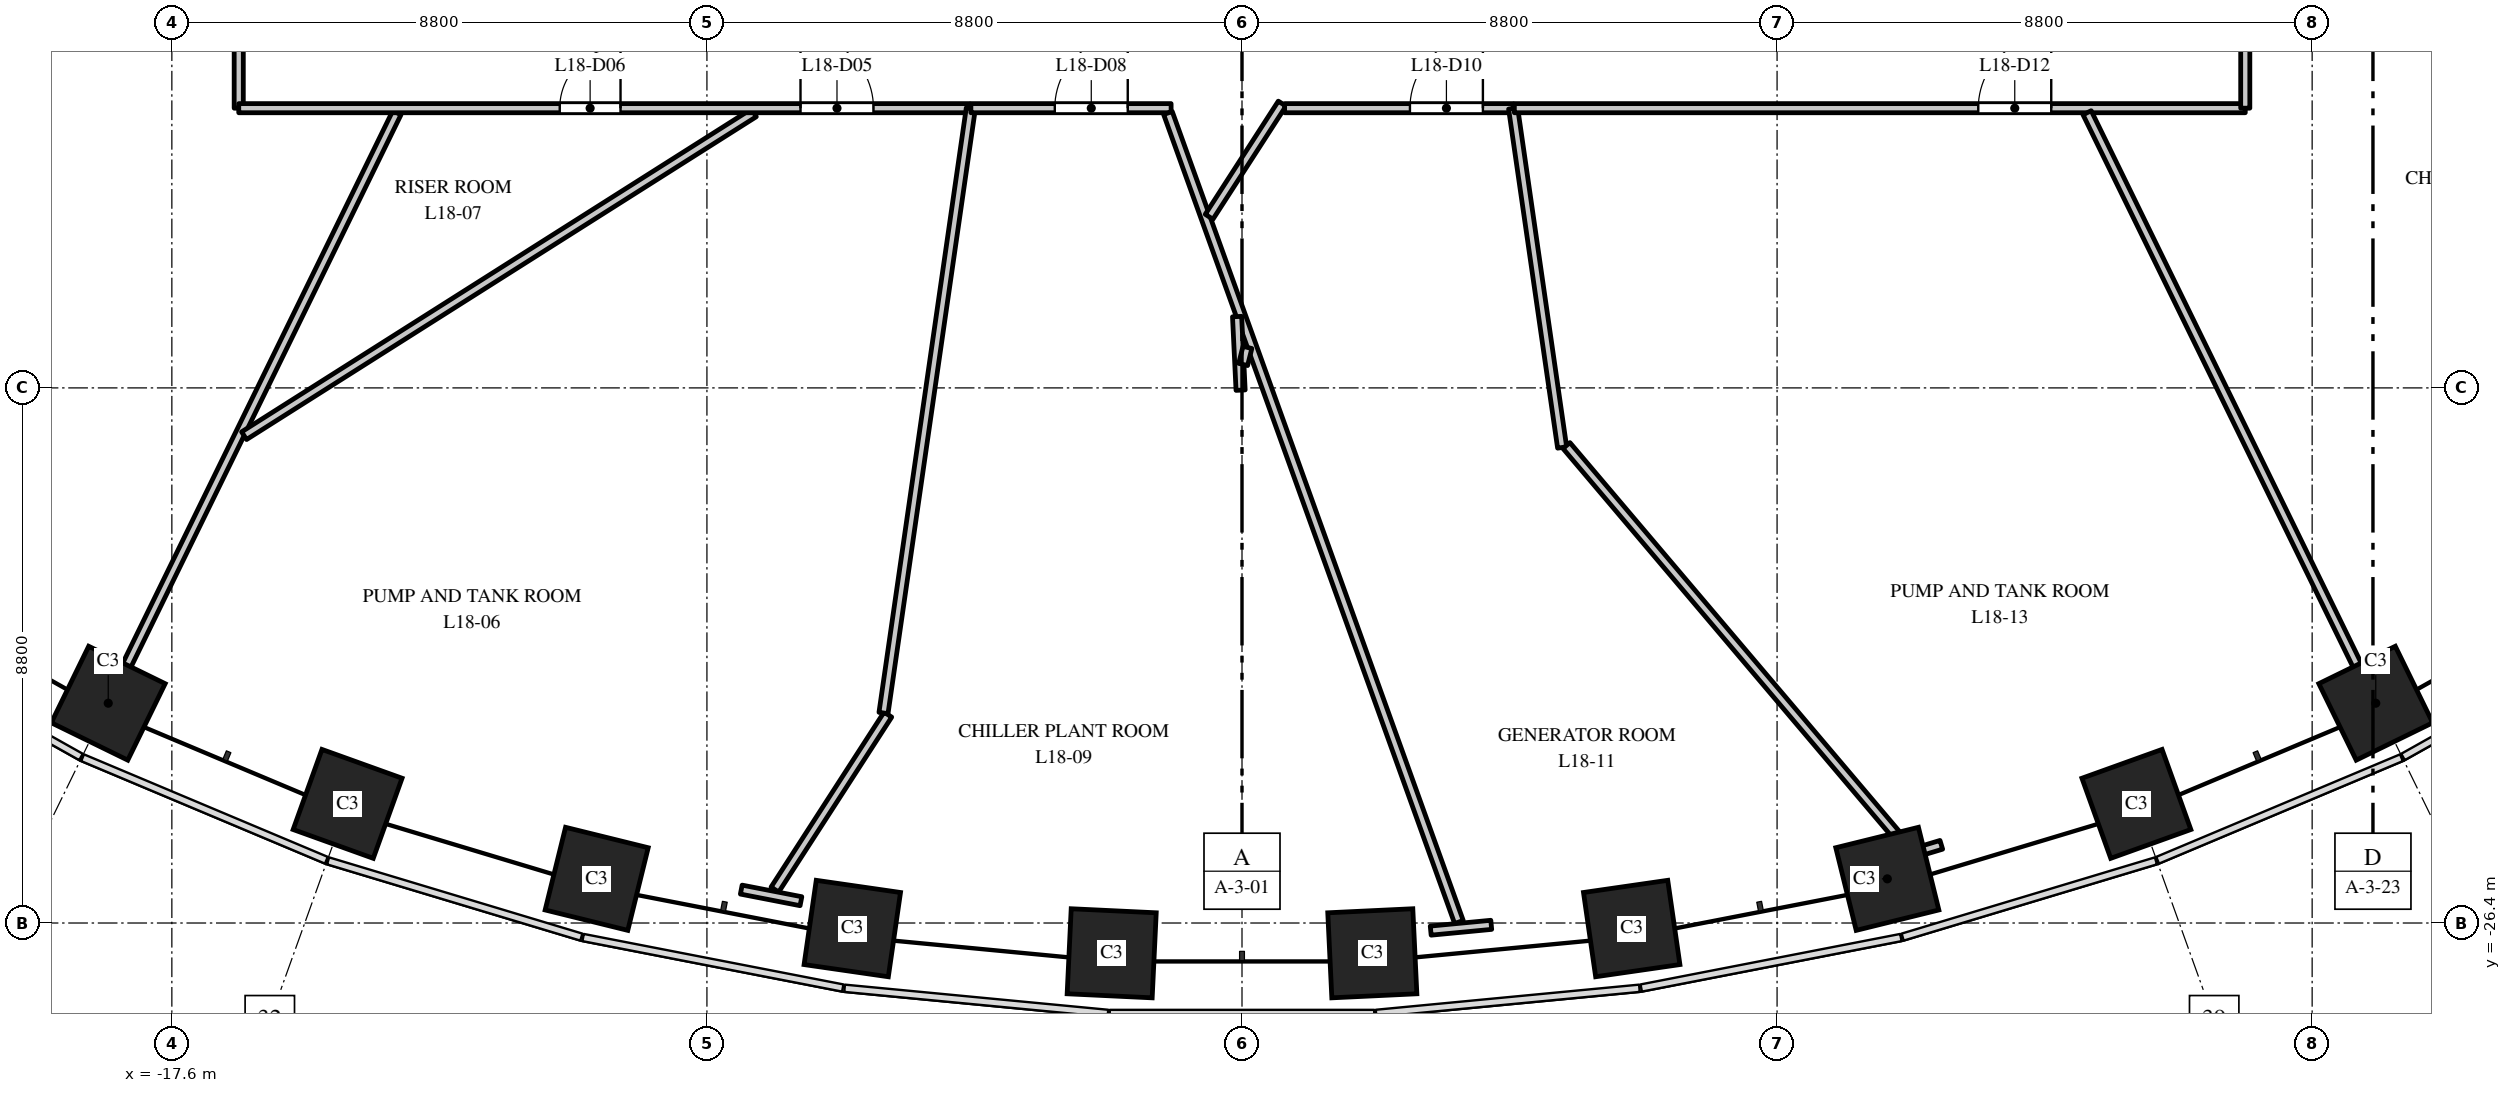
"""IFC4 building model, lengths in metres.
Left out: names, types, materials, properties, quantities, classifications, styles, units other than length and angle.
Written with IfcOpenShell. Run it as: python <this file> out.ifc"""

import sys

from ifc_helpers import new_model, si_unit, direction, frame, frame_2d, origin, origin_2d, place, context, subcontext, project, spatial, rectangle, extrude, element, fill, save


model = new_model("IFC4")
c1 = context("Model", 3, precision=1e-05, world=origin(), true_north=direction((0.0, 1.0)))
c2 = subcontext(c1, "Body", "Model", "MODEL_VIEW")
j1 = project(units=[si_unit("LENGTHUNIT", "METRE"), si_unit("PLANEANGLEUNIT", "RADIAN")], contexts=[c1])
p1 = place(None, origin())
s1 = spatial("IfcSite", under=j1, at=p1, CompositionType="ELEMENT")
p2 = place(p1, origin())
s2 = spatial("IfcBuilding", under=s1, at=p2, CompositionType="ELEMENT")
p3 = place(p2, frame((0.0, 0.0, 82.5)))
s3 = spatial("IfcBuildingStorey", under=s2, at=p3, CompositionType="ELEMENT", Elevation=82.5)
for number, where, z_axis, x_axis in (
    (1, (-18.646, -22.785, 0.0), (0.0, 0.0, 1.0), (0.898, -0.439, 0.0)),
    (2, (-14.709, -24.441, 0.0), (0.0, 0.0, 1.0), (0.941, -0.338, 0.0)),
    (3, (-10.613, -25.674, 0.0), (0.0, 0.0, 1.0), (0.971, -0.24, 0.0)),
    (4, (-6.409, -26.491, 0.0), (0.0, 0.0, 1.0), (0.99, -0.143, 0.0)),
    (5, (-2.143, -26.898, 0.0), (0.0, 0.0, 1.0), (0.999, -0.048, 0.0)),
    (6, (2.143, -26.898, 0.0), (0.0, 0.0, 1.0), (0.999, 0.048, 0.0)),
    (7, (6.409, -26.491, 0.0), (0.0, 0.0, 1.0), (0.99, 0.143, 0.0)),
    (8, (10.613, -25.674, 0.0), (0.0, 0.0, 1.0), (0.971, 0.24, 0.0)),
    (9, (14.709, -24.441, 0.0), (0.0, 0.0, 1.0), (0.941, 0.338, 0.0)),
    (10, (18.646, -22.785, 0.0), (0.0, 0.0, 1.0), (0.898, 0.439, 0.0)),
):
    element("IfcColumn", number, at=place(p3, frame(where, z_axis=z_axis, x_axis=x_axis)), inside=s3, PredefinedType="COLUMN", context=c2, shape_type="SweptSolid", body=[
        extrude(rectangle(XDim=1.4, YDim=1.4, at=origin_2d()), origin(), (0.0, 0.0, 1.0), 5.5),
    ])
p4 = place(p3, frame((-18.69, -22.875, 0.0), z_axis=(0.0, 0.0, 1.0), x_axis=(0.439201300969, 0.898388678261, 0.0)))
e11 = element("IfcWall", 11, at=p4, inside=s3, PredefinedType="PARTITIONING", context=c2, shape_type="SweptSolid", body=[
    extrude(rectangle(XDim=10.908, YDim=0.15, at=frame_2d((5.454, 0.0))), origin(), (0.0, 0.0, 1.0), 5.2),
])
p5 = place(p3, frame((-16.412, -18.386, 0.0), z_axis=(0.0, 0.0, 1.0), x_axis=(0.844855771647, 0.534994135588, 0.0)))
e12 = element("IfcWall", 12, at=p5, inside=s3, PredefinedType="PARTITIONING", context=c2, shape_type="SweptSolid", body=[
    extrude(rectangle(XDim=9.924, YDim=0.15, at=frame_2d((4.962, 0.0))), origin(), (0.0, 0.0, 1.0), 4.35),
])
p6 = place(p3, frame((-16.5, -13.0, 0.0), z_axis=(0.0, 0.0, 1.0), x_axis=(0.0, 1.0, 0.0)))
e13 = element("IfcWall", 13, at=p6, inside=s3, PredefinedType="PARTITIONING", context=c2, shape_type="SweptSolid", body=[
    extrude(rectangle(XDim=2.3, YDim=0.15, at=frame_2d((1.15, 0.0))), origin(), (0.0, 0.0, 1.0), 4.25),
])
p7 = place(p3, frame((-16.5, -13.0, 0.0), z_axis=(0.0, 0.0, 1.0), x_axis=(1.0, 0.0, 0.0)))
e14 = element("IfcWall", 14, at=p7, inside=s3, PredefinedType="PARTITIONING", context=c2, shape_type="SweptSolid", body=[
    extrude(rectangle(XDim=12.021, YDim=0.15, at=frame_2d((6.01, 0.0))), origin(), (0.0, 0.0, 1.0), 4.35),
])
p8 = place(p7, frame((9.239, 0.0, 0.0)))
e15 = element("IfcOpeningElement", 15, at=p8, cuts=e14, PredefinedType="OPENING", context=c2, shape_type="SweptSolid", body=[
    extrude(rectangle(XDim=1.2, YDim=2.1, at=frame_2d((0.6, 1.05))), frame((0.0, 0.085, 0.0), z_axis=(0.0, -1.0, 0.0), x_axis=(1.0, 0.0, 0.0)), (0.0, 0.0, 1.0), 0.17),
])
p9 = place(p7, frame((5.279, 0.0, 0.0)))
e16 = element("IfcOpeningElement", 16, at=p9, cuts=e14, PredefinedType="OPENING", context=c2, shape_type="SweptSolid", body=[
    extrude(rectangle(XDim=1.0, YDim=2.1, at=frame_2d((0.5, 1.05))), frame((0.0, 0.085, 0.0), z_axis=(0.0, -1.0, 0.0), x_axis=(1.0, 0.0, 0.0)), (0.0, 0.0, 1.0), 0.17),
])
p10 = place(p3, frame((-7.683, -25.85, 0.0), z_axis=(0.0, 0.0, 1.0), x_axis=(0.542618686321, 0.839979143346, 0.0)))
e17 = element("IfcWall", 17, at=p10, inside=s3, PredefinedType="PARTITIONING", context=c2, shape_type="SweptSolid", body=[
    extrude(rectangle(XDim=3.425, YDim=0.15, at=frame_2d((1.713, 0.0))), origin(), (0.0, 0.0, 1.0), 4.4),
])
p11 = place(p3, frame((-5.896, -22.946, 0.0), z_axis=(0.0, 0.0, 1.0), x_axis=(0.142955736686, 0.989729082804, 0.0)))
e18 = element("IfcWall", 18, at=p11, inside=s3, PredefinedType="PARTITIONING", context=c2, shape_type="SweptSolid", body=[
    extrude(rectangle(XDim=10.045, YDim=0.15, at=frame_2d((5.023, 0.0))), origin(), (0.0, 0.0, 1.0), 5.2),
])
p12 = place(p3, frame((-4.459, -13.0, 0.0), z_axis=(0.0, 0.0, 1.0), x_axis=(1.0, 0.0, 0.0)))
e19 = element("IfcWall", 19, at=p12, inside=s3, PredefinedType="PARTITIONING", context=c2, shape_type="SweptSolid", body=[
    extrude(rectangle(XDim=3.293, YDim=0.15, at=frame_2d((1.646, 0.0))), origin(), (0.0, 0.0, 1.0), 5.2),
])
p13 = place(p12, frame((1.38, 0.0, 0.0)))
e20 = element("IfcOpeningElement", 20, at=p13, cuts=e19, PredefinedType="OPENING", context=c2, shape_type="SweptSolid", body=[
    extrude(rectangle(XDim=1.2, YDim=2.1, at=frame_2d((0.6, 1.05))), frame((0.0, 0.085, 0.0), z_axis=(0.0, -1.0, 0.0), x_axis=(1.0, 0.0, 0.0)), (0.0, 0.0, 1.0), 0.17),
])
p14 = place(p3, frame((-1.218, -13.079, 0.0), z_axis=(0.0, 0.0, 1.0), x_axis=(0.338466321872, -0.940978506109, 0.0)))
e21 = element("IfcWall", 21, at=p14, inside=s3, PredefinedType="PARTITIONING", context=c2, shape_type="SweptSolid", body=[
    extrude(rectangle(XDim=14.139, YDim=0.15, at=frame_2d((7.07, 0.0))), origin(), (0.0, 0.0, 1.0), 4.35),
])
p15 = place(p3, frame((-0.081, -16.427, 0.0), z_axis=(0.0, 0.0, 1.0), x_axis=(0.047967320325, -0.998848905581, 0.0)))
e22 = element("IfcWall", 22, at=p15, inside=s3, PredefinedType="PARTITIONING", context=c2, shape_type="SweptSolid", body=[
    extrude(rectangle(XDim=1.211, YDim=0.15, at=frame_2d((0.606, 0.0))), origin(), (0.0, 0.0, 1.0), 5.2),
])
p16 = place(p3, frame((-0.541, -14.786, 0.0), z_axis=(0.0, 0.0, 1.0), x_axis=(0.542249897207, 0.840217262962, 0.0)))
e23 = element("IfcWall", 23, at=p16, inside=s3, PredefinedType="PARTITIONING", context=c2, shape_type="SweptSolid", body=[
    extrude(rectangle(XDim=2.215, YDim=0.15, at=frame_2d((1.107, 0.0))), origin(), (0.0, 0.0, 1.0), 5.2),
])
p17 = place(p3, frame((0.019, -17.215, 0.0), z_axis=(0.0, 0.0, 1.0), x_axis=(0.241940521765, 0.970291082061, 0.0)))
e24 = element("IfcWall", 24, at=p17, inside=s3, PredefinedType="PARTITIONING", context=c2, shape_type="SweptSolid", body=[
    extrude(rectangle(XDim=0.29, YDim=0.15, at=frame_2d((0.145, 0.0))), origin(), (0.0, 0.0, 1.0), 5.2),
])
p18 = place(p3, frame((0.701, -13.0, 0.0), z_axis=(0.0, 0.0, 1.0), x_axis=(1.0, 0.0, 0.0)))
e25 = element("IfcWall", 25, at=p18, inside=s3, PredefinedType="PARTITIONING", context=c2, shape_type="SweptSolid", body=[
    extrude(rectangle(XDim=3.758, YDim=0.15, at=frame_2d((1.879, 0.0))), origin(), (0.0, 0.0, 1.0), 4.35),
])
p19 = place(p18, frame((2.061, 0.0, 0.0)))
e26 = element("IfcOpeningElement", 26, at=p19, cuts=e25, PredefinedType="OPENING", context=c2, shape_type="SweptSolid", body=[
    extrude(rectangle(XDim=1.2, YDim=2.1, at=frame_2d((0.6, 1.05))), frame((0.0, 0.085, 0.0), z_axis=(0.0, -1.0, 0.0), x_axis=(1.0, 0.0, 0.0)), (0.0, 0.0, 1.0), 0.17),
])
p20 = place(p3, frame((4.459, -13.004, 0.0), z_axis=(0.0, 0.0, 1.0), x_axis=(0.143040939826, -0.989716772382, 0.0)))
e27 = element("IfcWall", 27, at=p20, inside=s3, PredefinedType="PARTITIONING", context=c2, shape_type="SweptSolid", body=[
    extrude(rectangle(XDim=5.634, YDim=0.15, at=frame_2d((2.817, 0.0))), origin(), (0.0, 0.0, 1.0), 5.2),
])
p21 = place(p3, frame((4.479, -13.0, 0.0), z_axis=(0.0, 0.0, 1.0), x_axis=(1.0, 0.0, 0.0)))
e28 = element("IfcWall", 28, at=p21, inside=s3, PredefinedType="PARTITIONING", context=c2, shape_type="SweptSolid", body=[
    extrude(rectangle(XDim=12.021, YDim=0.15, at=frame_2d((6.01, 0.0))), origin(), (0.0, 0.0, 1.0), 4.35),
])
p22 = place(p21, frame((7.63, 0.0, 0.0)))
e29 = element("IfcOpeningElement", 29, at=p22, cuts=e28, PredefinedType="OPENING", context=c2, shape_type="SweptSolid", body=[
    extrude(rectangle(XDim=1.2, YDim=2.1, at=frame_2d((0.6, 1.05))), frame((0.0, 0.085, 0.0), z_axis=(0.0, -1.0, 0.0), x_axis=(1.0, 0.0, 0.0)), (0.0, 0.0, 1.0), 0.17),
])
p23 = place(p3, frame((5.336, -18.548, 0.0), z_axis=(0.0, 0.0, 1.0), x_axis=(0.64652969132, -0.7628888243, 0.0)))
e30 = element("IfcWall", 30, at=p23, inside=s3, PredefinedType="PARTITIONING", context=c2, shape_type="SweptSolid", body=[
    extrude(rectangle(XDim=8.735, YDim=0.15, at=frame_2d((4.367, 0.0))), origin(), (0.0, 0.0, 1.0), 4.4),
])
p24 = place(p3, frame((13.899, -13.075, 0.0), z_axis=(0.0, 0.0, 1.0), x_axis=(0.439201300969, -0.898388678261, 0.0)))
e31 = element("IfcWall", 31, at=p24, inside=s3, PredefinedType="PARTITIONING", context=c2, shape_type="SweptSolid", body=[
    extrude(rectangle(XDim=10.908, YDim=0.15, at=frame_2d((5.454, 0.0))), origin(), (0.0, 0.0, 1.0), 5.2),
])
p25 = place(p3, frame((16.5, -13.0, 0.0), z_axis=(0.0, 0.0, 1.0), x_axis=(0.0, 1.0, 0.0)))
e32 = element("IfcWall", 32, at=p25, inside=s3, PredefinedType="PARTITIONING", context=c2, shape_type="SweptSolid", body=[
    extrude(rectangle(XDim=2.3, YDim=0.15, at=frame_2d((1.15, 0.0))), origin(), (0.0, 0.0, 1.0), 5.2),
])
for number, where, z_axis, x_axis in (
    (33, (-8.235, -25.851, 0.0), (0.0, 0.0, 1.0), (0.982, -0.191, 0.0)),
    (34, (3.104, -26.525, 0.0), (0.0, 0.0, 1.0), (0.995, 0.095, 0.0)),
):
    element("IfcWall", number, at=place(p3, frame(where, z_axis=z_axis, x_axis=x_axis)), inside=s3, PredefinedType="PARTITIONING", context=c2, shape_type="SweptSolid", body=[
        extrude(rectangle(XDim=1.0, YDim=0.15, at=frame_2d((0.5, 0.0))), origin(), (0.0, 0.0, 1.0), 5.2),
    ])
p26 = place(p3, frame((11.185, -25.209, 0.0), z_axis=(0.0, 0.0, 1.0), x_axis=(0.957581907725, 0.288161222232, 0.0)))
e35 = element("IfcWall", 35, at=p26, inside=s3, PredefinedType="PARTITIONING", context=c2, shape_type="SweptSolid", body=[
    extrude(rectangle(XDim=0.33, YDim=0.15, at=frame_2d((0.165, 0.0))), origin(), (0.0, 0.0, 1.0), 5.2),
])
p27 = place(p8, origin())
e36 = element("IfcDoor", 36, at=p27, inside=s3, OperationType="SINGLE_SWING_LEFT", PredefinedType="DOOR", context=c2, shape_type="SweptSolid", body=[
    extrude(rectangle(XDim=1.2, YDim=2.1, at=frame_2d((0.6, 1.05))), frame((0.0, 0.025, 0.0), z_axis=(0.0, -1.0, 0.0), x_axis=(1.0, 0.0, 0.0)), (0.0, 0.0, 1.0), 0.05),
])
fill(e15, e36)
p28 = place(p9, origin())
e37 = element("IfcDoor", 37, at=p28, inside=s3, OperationType="SINGLE_SWING_RIGHT", PredefinedType="DOOR", context=c2, shape_type="SweptSolid", body=[
    extrude(rectangle(XDim=1.0, YDim=2.1, at=frame_2d((0.5, 1.05))), frame((0.0, 0.025, 0.0), z_axis=(0.0, -1.0, 0.0), x_axis=(1.0, 0.0, 0.0)), (0.0, 0.0, 1.0), 0.05),
])
fill(e16, e37)
p29 = place(p13, origin())
e38 = element("IfcDoor", 38, at=p29, inside=s3, OperationType="SINGLE_SWING_RIGHT", PredefinedType="DOOR", context=c2, shape_type="SweptSolid", body=[
    extrude(rectangle(XDim=1.2, YDim=2.1, at=frame_2d((0.6, 1.05))), frame((0.0, 0.025, 0.0), z_axis=(0.0, -1.0, 0.0), x_axis=(1.0, 0.0, 0.0)), (0.0, 0.0, 1.0), 0.05),
])
fill(e20, e38)
p30 = place(p19, origin())
e39 = element("IfcDoor", 39, at=p30, inside=s3, OperationType="SINGLE_SWING_RIGHT", PredefinedType="DOOR", context=c2, shape_type="SweptSolid", body=[
    extrude(rectangle(XDim=1.2, YDim=2.1, at=frame_2d((0.6, 1.05))), frame((0.0, 0.025, 0.0), z_axis=(0.0, -1.0, 0.0), x_axis=(1.0, 0.0, 0.0)), (0.0, 0.0, 1.0), 0.05),
])
fill(e26, e39)
p31 = place(p22, origin())
e40 = element("IfcDoor", 40, at=p31, inside=s3, OperationType="SINGLE_SWING_RIGHT", PredefinedType="DOOR", context=c2, shape_type="SweptSolid", body=[
    extrude(rectangle(XDim=1.2, YDim=2.1, at=frame_2d((0.6, 1.05))), frame((0.0, 0.025, 0.0), z_axis=(0.0, -1.0, 0.0), x_axis=(1.0, 0.0, 0.0)), (0.0, 0.0, 1.0), 0.05),
])
fill(e29, e40)
save(model, sys.argv[1])
